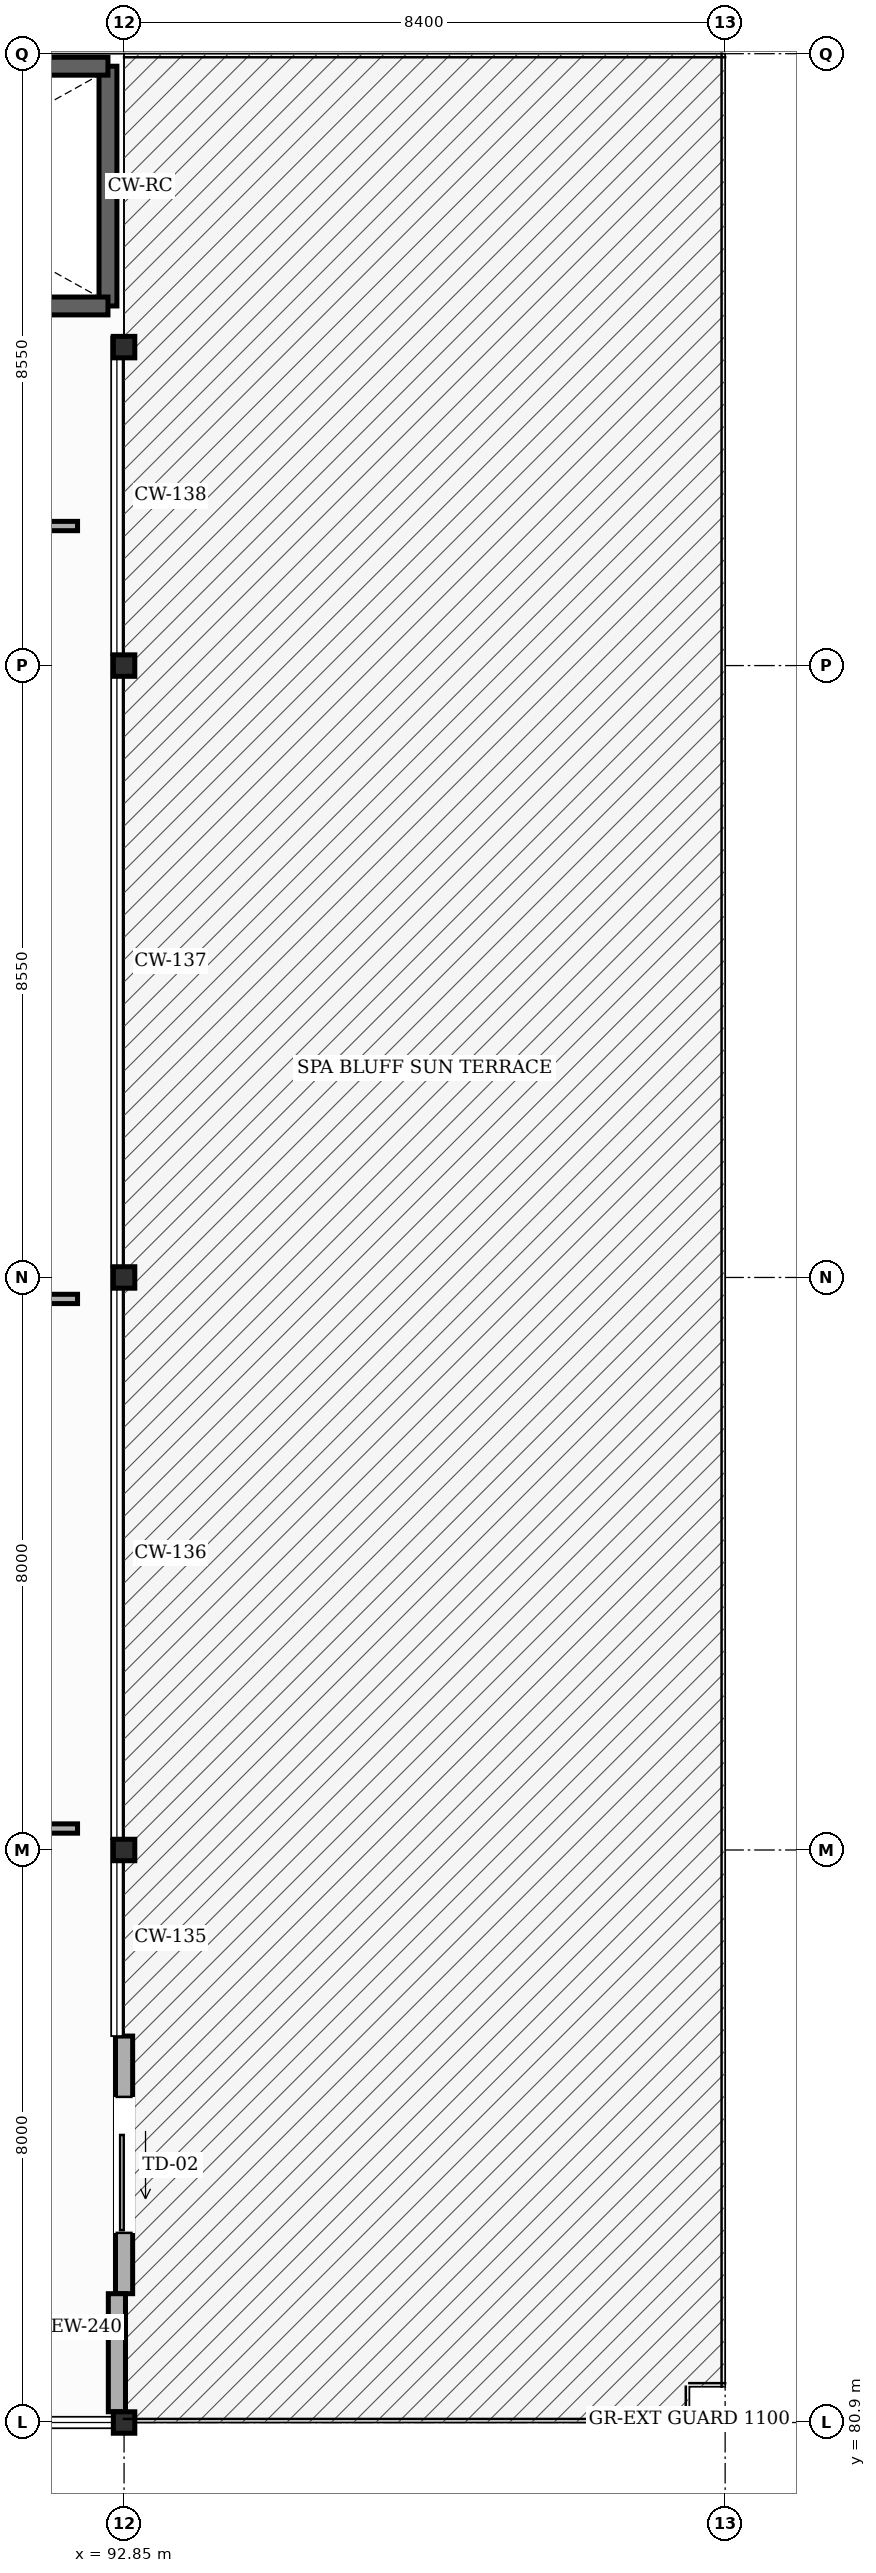
"""IFC4 building model, lengths in metres.
Left out: names, types, materials, properties, quantities, classifications, styles, units other than length and angle.
Written with IfcOpenShell. Run it as: python <this file> out.ifc"""

import sys

from ifc_helpers import new_model, si_unit, direction, frame, frame_2d, origin, origin_2d, place, context, subcontext, project, spatial, rectangle, i_section, extrude, element, fill, save


model = new_model("IFC4")
c1 = context("Model", 3, precision=1e-05, world=origin(), true_north=direction((0.0, 1.0)))
c2 = subcontext(c1, "Body", "Model", "MODEL_VIEW")
j1 = project(units=[si_unit("LENGTHUNIT", "METRE"), si_unit("PLANEANGLEUNIT", "RADIAN")], contexts=[c1])
p1 = place(None, origin())
s1 = spatial("IfcSite", under=j1, at=p1, CompositionType="ELEMENT")
p2 = place(p1, origin())
s2 = spatial("IfcBuilding", under=s1, at=p2, CompositionType="ELEMENT")
p3 = place(p2, frame((0.0, 0.0, 10.2)))
s3 = spatial("IfcBuildingStorey", under=s2, at=p3, CompositionType="ELEMENT", Elevation=10.2)
for number, where, z_axis, x_axis in (
    (1, (92.85, 80.9, 0.0), (0.0, 0.0, 1.0), (1.0, 0.0, 0.0)),
    (2, (92.85, 88.9, 0.0), (0.0, 0.0, 1.0), (1.0, 0.0, 0.0)),
    (3, (92.85, 96.9, 0.0), (0.0, 0.0, 1.0), (1.0, 0.0, 0.0)),
    (4, (92.85, 105.45, 0.0), (0.0, 0.0, 1.0), (1.0, 0.0, 0.0)),
    (5, (92.85, 109.9, 0.0), (0.0, 0.0, 1.0), (1.0, 0.0, 0.0)),
):
    element("IfcColumn", number, at=place(p3, frame(where, z_axis=z_axis, x_axis=x_axis)), inside=s3, PredefinedType="COLUMN", context=c2, shape_type="SweptSolid", body=[
        extrude(i_section(OverallWidth=0.3, OverallDepth=0.3, WebThickness=0.01, FlangeThickness=0.015, FilletRadius=0.013, at=origin_2d()), origin(), (0.0, 0.0, 1.0), 4.8),
    ])
p4 = place(p3, frame((92.85, 82.7, 0.0), z_axis=(0.0, 0.0, 1.0), x_axis=(0.0, 1.0, 0.0)))
e6 = element("IfcWall", 6, at=p4, inside=s3, PredefinedType="SOLIDWALL", context=c2, shape_type="SweptSolid", body=[
    extrude(rectangle(XDim=3.6, YDim=0.24, at=frame_2d((1.8, 0.0))), origin(), (0.0, 0.0, 1.0), 4.545),
])
p5 = place(p4, frame((0.85, 0.0, 0.0)))
e7 = element("IfcOpeningElement", 7, at=p5, cuts=e6, PredefinedType="OPENING", context=c2, shape_type="SweptSolid", body=[
    extrude(rectangle(XDim=1.9, YDim=2.35, at=frame_2d((0.95, 1.175))), frame((0.0, 0.13, 0.0), z_axis=(0.0, -1.0, 0.0), x_axis=(1.0, 0.0, 0.0)), (0.0, 0.0, 1.0), 0.26),
])
p6 = place(p3, frame((92.75, 82.7, 0.0), z_axis=(0.0, 0.0, 1.0), x_axis=(0.0, -1.0, 0.0)))
e8 = element("IfcWall", 8, at=p6, inside=s3, PredefinedType="SOLIDWALL", context=c2, shape_type="SweptSolid", body=[
    extrude(rectangle(XDim=1.65, YDim=0.24, at=frame_2d((0.825, 0.0))), origin(), (0.0, 0.0, 1.0), 4.545),
])
p7 = place(p3, frame((92.625, 113.825, 0.0), z_axis=(0.0, 0.0, 1.0), x_axis=(0.0, -1.0, 0.0)))
e9 = element("IfcWall", 9, at=p7, inside=s3, PredefinedType="SHEAR", context=c2, shape_type="SweptSolid", body=[
    extrude(rectangle(XDim=3.35, YDim=0.25, at=frame_2d((1.675, 0.0))), origin(), (0.0, 0.0, 1.0), 4.56),
])
p8 = place(p3, frame((92.625, 110.475, 0.0), z_axis=(0.0, 0.0, 1.0), x_axis=(-1.0, 0.0, 0.0)))
e10 = element("IfcWall", 10, at=p8, inside=s3, PredefinedType="SHEAR", context=c2, shape_type="SweptSolid", body=[
    extrude(rectangle(XDim=7.95, YDim=0.25, at=frame_2d((3.975, 0.0))), origin(), (0.0, 0.0, 1.0), 4.56),
])
p9 = place(p8, frame((6.125, 0.0, 0.0)))
e11 = element("IfcOpeningElement", 11, at=p9, cuts=e10, PredefinedType="OPENING", context=c2, shape_type="SweptSolid", body=[
    extrude(rectangle(XDim=1.3, YDim=2.2, at=frame_2d((0.65, 1.1))), frame((0.0, 0.135, 0.0), z_axis=(0.0, -1.0, 0.0), x_axis=(1.0, 0.0, 0.0)), (0.0, 0.0, 1.0), 0.27),
])
p10 = place(p3, frame((84.675, 113.825, 0.0), z_axis=(0.0, 0.0, 1.0), x_axis=(1.0, 0.0, 0.0)))
e12 = element("IfcWall", 12, at=p10, inside=s3, PredefinedType="SHEAR", context=c2, shape_type="SweptSolid", body=[
    extrude(rectangle(XDim=7.95, YDim=0.25, at=frame_2d((3.975, 0.0))), origin(), (0.0, 0.0, 1.0), 4.56),
])
for number, where, z_axis, x_axis in (
    (13, (77.6, 89.2, 0.0), (0.0, 0.0, 1.0), (1.0, 0.0, 0.0)),
    (14, (77.6, 96.6, 0.0), (0.0, 0.0, 1.0), (1.0, 0.0, 0.0)),
    (15, (77.6, 107.4, 0.0), (0.0, 0.0, 1.0), (1.0, 0.0, 0.0)),
):
    element("IfcWall", number, at=place(p3, frame(where, z_axis=z_axis, x_axis=x_axis)), inside=s3, PredefinedType="PARTITIONING", context=c2, shape_type="SweptSolid", body=[
        extrude(rectangle(XDim=14.6, YDim=0.13, at=frame_2d((7.3, 0.0))), origin(), (0.0, 0.0, 1.0), 4.545),
    ])
p11 = place(p5, origin())
e16 = element("IfcDoor", 16, at=p11, inside=s3, OperationType="SLIDING_TO_LEFT", PredefinedType="DOOR", context=c2, shape_type="SweptSolid", body=[
    extrude(rectangle(XDim=1.9, YDim=2.35, at=frame_2d((0.95, 1.175))), frame((0.0, 0.025, 0.0), z_axis=(0.0, -1.0, 0.0), x_axis=(1.0, 0.0, 0.0)), (0.0, 0.0, 1.0), 0.05),
])
fill(e7, e16)
save(model, sys.argv[1])
